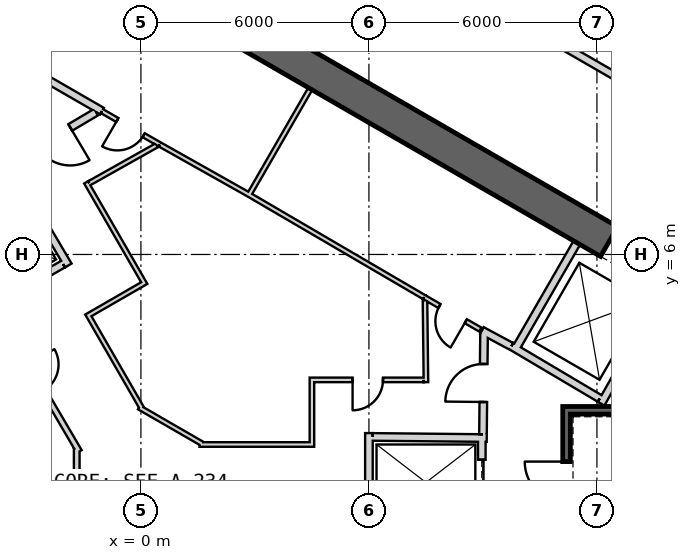
"""IFC4 building model, lengths in metres.
Left out: names, types, materials, properties, quantities, classifications, styles, units other than length and angle.
Written with IfcOpenShell. Run it as: python <this file> out.ifc"""

import sys

from ifc_helpers import new_model, si_unit, direction, frame, frame_2d, origin, place, context, subcontext, project, spatial, rectangle, extrude, element, fill, save


model = new_model("IFC4")
c1 = context("Model", 3, precision=1e-05, world=origin(), true_north=direction((0.0, 1.0)))
c2 = subcontext(c1, "Body", "Model", "MODEL_VIEW")
j1 = project(units=[si_unit("LENGTHUNIT", "METRE"), si_unit("PLANEANGLEUNIT", "RADIAN")], contexts=[c1])
p1 = place(None, origin())
s1 = spatial("IfcSite", under=j1, at=p1, CompositionType="ELEMENT")
p2 = place(p1, origin())
s2 = spatial("IfcBuilding", under=s1, at=p2, CompositionType="ELEMENT")
p3 = place(p2, frame((0.0, 0.0, 310.4)))
s3 = spatial("IfcBuildingStorey", under=s2, at=p3, CompositionType="ELEMENT", Elevation=310.4)
p4 = place(p3, frame((19.475, 2.208, 0.0), z_axis=(0.0, 0.0, 1.0), x_axis=(-0.866028369851, 0.499994862586, 0.0)))
e1 = element("IfcWall", 1, at=p4, inside=s3, PredefinedType="SHEAR", context=c2, shape_type="SweptSolid", body=[
    extrude(rectangle(XDim=31.523, YDim=0.9, at=frame_2d((15.762, 0.0))), origin(), (0.0, 0.0, 1.0), 3.9),
])
p5 = place(p4, frame((7.062, 0.0, 0.0)))
e2 = element("IfcOpeningElement", 2, at=p5, cuts=e1, PredefinedType="OPENING", context=c2, shape_type="SweptSolid", body=[
    extrude(rectangle(XDim=1.2, YDim=2.4, at=frame_2d((0.6, 1.2))), frame((0.0, 0.46, 0.0), z_axis=(0.0, -1.0, 0.0), x_axis=(1.0, 0.0, 0.0)), (0.0, 0.0, 1.0), 0.92),
])
p6 = place(p4, frame((3.612, 0.0, 0.0)))
e3 = element("IfcOpeningElement", 3, at=p6, cuts=e1, PredefinedType="OPENING", context=c2, shape_type="SweptSolid", body=[
    extrude(rectangle(XDim=1.2, YDim=2.4, at=frame_2d((0.6, 1.2))), frame((0.0, 0.46, 0.0), z_axis=(0.0, -1.0, 0.0), x_axis=(1.0, 0.0, 0.0)), (0.0, 0.0, 1.0), 0.92),
])
p7 = place(p4, frame((26.712, 0.0, 0.0)))
e4 = element("IfcOpeningElement", 4, at=p7, cuts=e1, PredefinedType="OPENING", context=c2, shape_type="SweptSolid", body=[
    extrude(rectangle(XDim=1.2, YDim=2.4, at=frame_2d((0.6, 1.2))), frame((0.0, 0.46, 0.0), z_axis=(0.0, -1.0, 0.0), x_axis=(1.0, 0.0, 0.0)), (0.0, 0.0, 1.0), 0.92),
])
p8 = place(p3, frame((9.847, 3.495, 0.0), z_axis=(0.0, 0.0, 1.0), x_axis=(0.499984717929, 0.866034226713, 0.0)))
e5 = element("IfcWall", 5, at=p8, inside=s3, PredefinedType="PLUMBINGWALL", context=c2, shape_type="SweptSolid", body=[
    extrude(rectangle(XDim=3.25, YDim=0.2, at=frame_2d((1.625, 0.0))), origin(), (0.0, 0.0, 1.0), 3.6),
])
p9 = place(p3, frame((12.11, 2.073, 0.0), z_axis=(0.0, 0.0, 1.0), x_axis=(0.49196600604, 0.870614408852, 0.0)))
e6 = element("IfcWall", 6, at=p9, inside=s3, PredefinedType="PLUMBINGWALL", context=c2, shape_type="SweptSolid", body=[
    extrude(rectangle(XDim=3.35, YDim=0.2, at=frame_2d((1.675, 0.0))), origin(), (0.0, 0.0, 1.0), 3.6),
])
p10 = place(p3, frame((12.073, 2.211, 0.0), z_axis=(0.0, 0.0, 1.0), x_axis=(-0.860414880418, 0.509594185166, 0.0)))
e7 = element("IfcWall", 7, at=p10, inside=s3, PredefinedType="PLUMBINGWALL", context=c2, shape_type="SweptSolid", body=[
    extrude(rectangle(XDim=2.7, YDim=0.2, at=frame_2d((1.35, 0.0))), origin(), (0.0, 0.0, 1.0), 3.6),
])
p11 = place(p3, frame((19.2, 1.9, -0.3), z_axis=(0.0, 0.0, 1.0), x_axis=(-1.0, 0.0, 0.0)))
e8 = element("IfcWall", 8, at=p11, inside=s3, PredefinedType="SHEAR", context=c2, shape_type="SweptSolid", body=[
    extrude(rectangle(XDim=8.1, YDim=0.2, at=frame_2d((4.05, 0.0))), origin(), (0.0, 0.0, 1.0), 3.9),
])
p12 = place(p3, frame((11.2, -1.8, -0.3), z_axis=(0.0, 0.0, 1.0), x_axis=(0.0, 1.0, 0.0)))
e9 = element("IfcWall", 9, at=p12, inside=s3, PredefinedType="SHEAR", context=c2, shape_type="SweptSolid", body=[
    extrude(rectangle(XDim=3.6, YDim=0.2, at=frame_2d((1.8, 0.0))), origin(), (0.0, 0.0, 1.0), 3.9),
])
p13 = place(p12, frame((1.25, 0.0, 0.3)))
e10 = element("IfcOpeningElement", 10, at=p13, cuts=e9, PredefinedType="OPENING", context=c2, shape_type="SweptSolid", body=[
    extrude(rectangle(XDim=1.1, YDim=2.1, at=frame_2d((0.55, 1.05))), frame((0.0, 0.11, 0.0), z_axis=(0.0, -1.0, 0.0), x_axis=(1.0, 0.0, 0.0)), (0.0, 0.0, 1.0), 0.22),
])
p14 = place(p3, frame((8.97, 1.2, 0.0), z_axis=(0.0, 0.0, 1.0), x_axis=(0.0, -1.0, 0.0)))
e11 = element("IfcWall", 11, at=p14, inside=s3, PredefinedType="PLUMBINGWALL", context=c2, shape_type="SweptSolid", body=[
    extrude(rectangle(XDim=2.4, YDim=0.2, at=frame_2d((1.2, 0.0))), origin(), (0.0, 0.0, 1.0), 3.6),
])
p15 = place(p14, frame((0.6, 0.0, 0.0)))
e12 = element("IfcOpeningElement", 12, at=p15, cuts=e11, PredefinedType="OPENING", context=c2, shape_type="SweptSolid", body=[
    extrude(rectangle(XDim=1.2, YDim=2.4, at=frame_2d((0.6, 1.2))), frame((0.0, 0.11, 0.0), z_axis=(0.0, -1.0, 0.0), x_axis=(1.0, 0.0, 0.0)), (0.0, 0.0, 1.0), 0.22),
])
p16 = place(p3, frame((6.0, -1.09, 0.0), z_axis=(0.0, 0.0, 1.0), x_axis=(0.0, 1.0, 0.0)))
e13 = element("IfcWall", 13, at=p16, inside=s3, PredefinedType="PLUMBINGWALL", context=c2, shape_type="SweptSolid", body=[
    extrude(rectangle(XDim=2.39, YDim=0.2, at=frame_2d((1.195, 0.0))), origin(), (0.0, 0.0, 1.0), 3.6),
])
p17 = place(p3, frame((9.1, 1.169, 0.0), z_axis=(0.0, 0.0, 1.0), x_axis=(-0.99994990606, 0.010009264196, 0.0)))
e14 = element("IfcWall", 14, at=p17, inside=s3, PredefinedType="PLUMBINGWALL", context=c2, shape_type="SweptSolid", body=[
    extrude(rectangle(XDim=3.0, YDim=0.2, at=frame_2d((1.5, 0.0))), origin(), (0.0, 0.0, 1.0), 3.6),
])
p18 = place(p3, frame((-3.538, 8.465, 0.0), z_axis=(0.0, 0.0, 1.0), x_axis=(0.508616218331, -0.860993346345, 0.0)))
e15 = element("IfcWall", 15, at=p18, inside=s3, PredefinedType="PLUMBINGWALL", context=c2, shape_type="SweptSolid", body=[
    extrude(rectangle(XDim=3.2, YDim=0.2, at=frame_2d((1.6, 0.0))), origin(), (0.0, 0.0, 1.0), 3.6),
])
p19 = place(p3, frame((-2.047, 5.746, 0.0), z_axis=(0.0, 0.0, 1.0), x_axis=(-0.866019606374, -0.500010041276, 0.0)))
e16 = element("IfcWall", 16, at=p19, inside=s3, PredefinedType="PLUMBINGWALL", context=c2, shape_type="SweptSolid", body=[
    extrude(rectangle(XDim=2.205, YDim=0.2, at=frame_2d((1.102, 0.0))), origin(), (0.0, 0.0, 1.0), 3.6),
])
p20 = place(p3, frame((4.457, 10.359, 0.0), z_axis=(0.0, 0.0, 1.0), x_axis=(-0.500017246033, -0.866015446554, 0.0)))
e17 = element("IfcWall", 17, at=p20, inside=s3, PredefinedType="PARTITIONING", context=c2, shape_type="SweptSolid", body=[
    extrude(rectangle(XDim=3.25, YDim=0.12, at=frame_2d((1.625, 0.0))), origin(), (0.0, 0.0, 1.0), 3.6),
])
p21 = place(p3, frame((8.974, 3.999, 0.0), z_axis=(0.0, 0.0, 1.0), x_axis=(0.880917147855, -0.473270513147, 0.0)))
e18 = element("IfcWall", 18, at=p21, inside=s3, PredefinedType="PARTITIONING", context=c2, shape_type="SweptSolid", body=[
    extrude(rectangle(XDim=0.878, YDim=0.2, at=frame_2d((0.439, 0.0))), origin(), (0.0, 0.0, 1.0), 3.6),
])
p22 = place(p3, frame((7.457, 4.875, 0.0), z_axis=(0.0, 0.0, 1.0), x_axis=(-0.863262357411, 0.504755487615, 0.0)))
e19 = element("IfcWall", 19, at=p22, inside=s3, PredefinedType="PARTITIONING", context=c2, shape_type="SweptSolid", body=[
    extrude(rectangle(XDim=5.37, YDim=0.12, at=frame_2d((2.685, 0.0))), origin(), (0.0, 0.0, 1.0), 3.6),
])
p23 = place(p3, frame((-1.024, 9.771, 0.0), z_axis=(0.0, 0.0, 1.0), x_axis=(0.866039397417, -0.499975761534, 0.0)))
e20 = element("IfcWall", 20, at=p23, inside=s3, PredefinedType="PARTITIONING", context=c2, shape_type="SweptSolid", body=[
    extrude(rectangle(XDim=1.752, YDim=0.12, at=frame_2d((0.876, 0.0))), origin(), (0.0, 0.0, 1.0), 3.6),
])
p24 = place(p23, frame((0.466, 0.0, 0.0)))
e21 = element("IfcOpeningElement", 21, at=p24, cuts=e20, PredefinedType="OPENING", context=c2, shape_type="SweptSolid", body=[
    extrude(rectangle(XDim=0.8, YDim=2.1, at=frame_2d((0.4, 1.05))), frame((0.0, 0.07, 0.0), z_axis=(0.0, -1.0, 0.0), x_axis=(1.0, 0.0, 0.0)), (0.0, 0.0, 1.0), 0.14),
])
p25 = place(p3, frame((7.457, 4.875, 0.0), z_axis=(0.0, 0.0, 1.0), x_axis=(0.866027945518, -0.499995597562, 0.0)))
e22 = element("IfcWall", 22, at=p25, inside=s3, PredefinedType="PARTITIONING", context=c2, shape_type="SweptSolid", body=[
    extrude(rectangle(XDim=1.702, YDim=0.12, at=frame_2d((0.851, 0.0))), origin(), (0.0, 0.0, 1.0), 3.6),
])
p26 = place(p25, frame((0.461, 0.0, 0.0)))
e23 = element("IfcOpeningElement", 23, at=p26, cuts=e22, PredefinedType="OPENING", context=c2, shape_type="SweptSolid", body=[
    extrude(rectangle(XDim=0.8, YDim=2.1, at=frame_2d((0.4, 1.05))), frame((0.0, 0.07, 0.0), z_axis=(0.0, -1.0, 0.0), x_axis=(1.0, 0.0, 0.0)), (0.0, 0.0, 1.0), 0.14),
])
p27 = place(p3, frame((-4.296, 11.66, 0.0), z_axis=(0.0, 0.0, 1.0), x_axis=(0.866027389382, -0.499996560828, 0.0)))
e24 = element("IfcWall", 24, at=p27, inside=s3, PredefinedType="PARTITIONING", context=c2, shape_type="SweptSolid", body=[
    extrude(rectangle(XDim=3.778, YDim=0.2, at=frame_2d((1.889, 0.0))), origin(), (0.0, 0.0, 1.0), 3.6),
])
p28 = place(p3, frame((2.821, 7.586, 0.0), z_axis=(0.0, 0.0, 1.0), x_axis=(-0.871426548871, 0.490526013503, 0.0)))
e25 = element("IfcWall", 25, at=p28, inside=s3, PredefinedType="PARTITIONING", context=c2, shape_type="SweptSolid", body=[
    extrude(rectangle(XDim=2.67, YDim=0.12, at=frame_2d((1.335, 0.0))), origin(), (0.0, 0.0, 1.0), 3.6),
])
p29 = place(p3, frame((9.001, 1.27, 0.0), z_axis=(0.0, 0.0, 1.0), x_axis=(0.010723968736, 0.999942496594, 0.0)))
e26 = element("IfcWall", 26, at=p29, inside=s3, PredefinedType="PARTITIONING", context=c2, shape_type="SweptSolid", body=[
    extrude(rectangle(XDim=2.709, YDim=0.2, at=frame_2d((1.354, 0.0))), origin(), (0.0, 0.0, 1.0), 3.6),
])
p30 = place(p29, frame((0.848, 0.0, 0.0)))
e27 = element("IfcOpeningElement", 27, at=p30, cuts=e26, PredefinedType="OPENING", context=c2, shape_type="SweptSolid", body=[
    extrude(rectangle(XDim=1.0, YDim=2.1, at=frame_2d((0.5, 1.05))), frame((0.0, 0.11, 0.0), z_axis=(0.0, -1.0, 0.0), x_axis=(1.0, 0.0, 0.0)), (0.0, 0.0, 1.0), 0.22),
])
p31 = place(p3, frame((-1.179, 9.745, 0.0), z_axis=(0.0, 0.0, 1.0), x_axis=(-0.860630814782, -0.509229418482, 0.0)))
e28 = element("IfcWall", 28, at=p31, inside=s3, PredefinedType="PARTITIONING", context=c2, shape_type="SweptSolid", body=[
    extrude(rectangle(XDim=2.582, YDim=0.2, at=frame_2d((1.291, 0.0))), origin(), (0.0, 0.0, 1.0), 3.6),
])
p32 = place(p31, frame((0.791, 0.0, 0.0)))
e29 = element("IfcOpeningElement", 29, at=p32, cuts=e28, PredefinedType="OPENING", context=c2, shape_type="SweptSolid", body=[
    extrude(rectangle(XDim=1.0, YDim=2.1, at=frame_2d((0.5, 1.05))), frame((0.0, 0.11, 0.0), z_axis=(0.0, -1.0, 0.0), x_axis=(1.0, 0.0, 0.0)), (0.0, 0.0, 1.0), 0.22),
])
p33 = place(p3, frame((-1.624, 0.815, 0.0), z_axis=(0.0, 0.0, 1.0), x_axis=(-0.505868173579, 0.862610799237, 0.0)))
e30 = element("IfcWall", 30, at=p33, inside=s3, PredefinedType="PLUMBINGWALL", context=c2, shape_type="SweptSolid", body=[
    extrude(rectangle(XDim=4.383, YDim=0.15, at=frame_2d((2.191, 0.0))), origin(), (0.0, 0.0, 1.0), 3.6),
])
p34 = place(p33, frame((1.855, 0.0, 0.0)))
e31 = element("IfcOpeningElement", 31, at=p34, cuts=e30, PredefinedType="OPENING", context=c2, shape_type="SweptSolid", body=[
    extrude(rectangle(XDim=0.8, YDim=2.1, at=frame_2d((0.4, 1.05))), frame((0.0, 0.085, 0.0), z_axis=(0.0, -1.0, 0.0), x_axis=(1.0, 0.0, 0.0)), (0.0, 0.0, 1.0), 0.17),
])
p35 = place(p3, frame((-1.689, -1.053, 0.0), z_axis=(0.0, 0.0, 1.0), x_axis=(0.0, 1.0, 0.0)))
e32 = element("IfcWall", 32, at=p35, inside=s3, PredefinedType="PLUMBINGWALL", context=c2, shape_type="SweptSolid", body=[
    extrude(rectangle(XDim=1.954, YDim=0.15, at=frame_2d((0.977, 0.0))), origin(), (0.0, 0.0, 1.0), 3.6),
])
p36 = place(p3, frame((7.501, 2.64, 0.0), z_axis=(0.0, 0.0, 1.0), x_axis=(-0.01178388431, 0.999930567625, 0.0)))
e33 = element("IfcWall", 33, at=p36, inside=s3, PredefinedType="PARTITIONING", context=c2, shape_type="SweptSolid", body=[
    extrude(rectangle(XDim=2.155, YDim=0.12, at=frame_2d((1.077, 0.0))), origin(), (0.0, 0.0, 1.0), 3.6),
])
p37 = place(p3, frame((4.44, 2.7, 0.0), z_axis=(0.0, 0.0, 1.0), x_axis=(1.0, 0.0, 0.0)))
e34 = element("IfcWall", 34, at=p37, inside=s3, PredefinedType="PARTITIONING", context=c2, shape_type="SweptSolid", body=[
    extrude(rectangle(XDim=3.0, YDim=0.12, at=frame_2d((1.5, 0.0))), origin(), (0.0, 0.0, 1.0), 3.6),
])
p38 = place(p37, frame((1.13, 0.0, 0.0)))
e35 = element("IfcOpeningElement", 35, at=p38, cuts=e34, PredefinedType="OPENING", context=c2, shape_type="SweptSolid", body=[
    extrude(rectangle(XDim=0.8, YDim=2.1, at=frame_2d((0.4, 1.05))), frame((0.0, 0.07, 0.0), z_axis=(0.0, -1.0, 0.0), x_axis=(1.0, 0.0, 0.0)), (0.0, 0.0, 1.0), 0.14),
])
p39 = place(p3, frame((4.5, 0.94, 0.0), z_axis=(0.0, 0.0, 1.0), x_axis=(0.0, 1.0, 0.0)))
e36 = element("IfcWall", 36, at=p39, inside=s3, PredefinedType="PARTITIONING", context=c2, shape_type="SweptSolid", body=[
    extrude(rectangle(XDim=1.7, YDim=0.12, at=frame_2d((0.85, 0.0))), origin(), (0.0, 0.0, 1.0), 3.6),
])
p40 = place(p3, frame((1.542, 1.0, 0.0), z_axis=(0.0, 0.0, 1.0), x_axis=(1.0, 0.0, 0.0)))
e37 = element("IfcWall", 37, at=p40, inside=s3, PredefinedType="PARTITIONING", context=c2, shape_type="SweptSolid", body=[
    extrude(rectangle(XDim=2.898, YDim=0.12, at=frame_2d((1.449, 0.0))), origin(), (0.0, 0.0, 1.0), 3.6),
])
p41 = place(p3, frame((-0.047, 1.977, 0.0), z_axis=(0.0, 0.0, 1.0), x_axis=(0.865998615205, -0.500046396311, 0.0)))
e38 = element("IfcWall", 38, at=p41, inside=s3, PredefinedType="PARTITIONING", context=c2, shape_type="SweptSolid", body=[
    extrude(rectangle(XDim=1.935, YDim=0.12, at=frame_2d((0.968, 0.0))), origin(), (0.0, 0.0, 1.0), 3.6),
])
p42 = place(p3, frame((-1.414, 4.449, 0.0), z_axis=(0.0, 0.0, 1.0), x_axis=(0.500028961621, -0.866008682139, 0.0)))
e39 = element("IfcWall", 39, at=p42, inside=s3, PredefinedType="PARTITIONING", context=c2, shape_type="SweptSolid", body=[
    extrude(rectangle(XDim=2.896, YDim=0.12, at=frame_2d((1.448, 0.0))), origin(), (0.0, 0.0, 1.0), 3.6),
])
p43 = place(p3, frame((0.14, 5.277, 0.0), z_axis=(0.0, 0.0, 1.0), x_axis=(-0.865989465428, -0.500062241894, 0.0)))
e40 = element("IfcWall", 40, at=p43, inside=s3, PredefinedType="PARTITIONING", context=c2, shape_type="SweptSolid", body=[
    extrude(rectangle(XDim=1.7, YDim=0.12, at=frame_2d((0.85, 0.0))), origin(), (0.0, 0.0, 1.0), 3.6),
])
p44 = place(p3, frame((-1.442, 7.897, 0.0), z_axis=(0.0, 0.0, 1.0), x_axis=(0.499990139034, -0.866031096941, 0.0)))
e41 = element("IfcWall", 41, at=p44, inside=s3, PredefinedType="PARTITIONING", context=c2, shape_type="SweptSolid", body=[
    extrude(rectangle(XDim=3.0, YDim=0.12, at=frame_2d((1.5, 0.0))), origin(), (0.0, 0.0, 1.0), 3.6),
])
p45 = place(p3, frame((0.414, 8.871, 0.0), z_axis=(0.0, 0.0, 1.0), x_axis=(-0.871809386997, -0.48984527429, 0.0)))
e42 = element("IfcWall", 42, at=p45, inside=s3, PredefinedType="PARTITIONING", context=c2, shape_type="SweptSolid", body=[
    extrude(rectangle(XDim=2.034, YDim=0.12, at=frame_2d((1.017, 0.0))), origin(), (0.0, 0.0, 1.0), 3.6),
])
p46 = place(p3, frame((22.074, 5.153, 0.0), z_axis=(0.0, 0.0, 1.0), x_axis=(-0.866024844342, 0.500000968981, 0.0)))
e43 = element("IfcWall", 43, at=p46, inside=s3, PredefinedType="PARTITIONING", context=c2, shape_type="SweptSolid", body=[
    extrude(rectangle(XDim=17.073, YDim=0.2, at=frame_2d((8.536, 0.0))), origin(), (0.0, 0.0, 1.0), 2.88),
])
p47 = place(p46, frame((8.075, 0.0, 0.0)))
e44 = element("IfcOpeningElement", 44, at=p47, cuts=e43, PredefinedType="OPENING", context=c2, shape_type="SweptSolid", body=[
    extrude(rectangle(XDim=1.0, YDim=2.1, at=frame_2d((0.5, 1.05))), frame((0.0, 0.11, 0.0), z_axis=(0.0, -1.0, 0.0), x_axis=(1.0, 0.0, 0.0)), (0.0, 0.0, 1.0), 0.22),
])
p48 = place(p13, origin())
e45 = element("IfcDoor", 45, at=p48, inside=s3, OperationType="SINGLE_SWING_LEFT", PredefinedType="USERDEFINED", context=c2, shape_type="SweptSolid", body=[
    extrude(rectangle(XDim=1.1, YDim=2.1, at=frame_2d((0.55, 1.05))), frame((0.0, 0.025, 0.0), z_axis=(0.0, -1.0, 0.0), x_axis=(1.0, 0.0, 0.0)), (0.0, 0.0, 1.0), 0.05),
])
fill(e10, e45)
p49 = place(p30, origin())
e46 = element("IfcDoor", 46, at=p49, inside=s3, OperationType="SINGLE_SWING_LEFT", PredefinedType="USERDEFINED", context=c2, shape_type="SweptSolid", body=[
    extrude(rectangle(XDim=1.0, YDim=2.1, at=frame_2d((0.5, 1.05))), frame((0.0, 0.025, 0.0), z_axis=(0.0, -1.0, 0.0), x_axis=(1.0, 0.0, 0.0)), (0.0, 0.0, 1.0), 0.05),
])
fill(e27, e46)
p50 = place(p15, origin())
e47 = element("IfcDoor", 47, at=p50, inside=s3, OperationType="SLIDING_TO_LEFT", PredefinedType="USERDEFINED", context=c2, shape_type="SweptSolid", body=[
    extrude(rectangle(XDim=1.2, YDim=2.4, at=frame_2d((0.6, 1.2))), frame((0.0, 0.025, 0.0), z_axis=(0.0, -1.0, 0.0), x_axis=(1.0, 0.0, 0.0)), (0.0, 0.0, 1.0), 0.05),
])
fill(e12, e47)
p51 = place(p32, origin())
e48 = element("IfcDoor", 48, at=p51, inside=s3, OperationType="SINGLE_SWING_LEFT", PredefinedType="USERDEFINED", context=c2, shape_type="SweptSolid", body=[
    extrude(rectangle(XDim=1.0, YDim=2.1, at=frame_2d((0.5, 1.05))), frame((0.0, 0.025, 0.0), z_axis=(0.0, -1.0, 0.0), x_axis=(1.0, 0.0, 0.0)), (0.0, 0.0, 1.0), 0.05),
])
fill(e29, e48)
p52 = place(p38, origin())
e49 = element("IfcDoor", 49, at=p52, inside=s3, OperationType="SINGLE_SWING_LEFT", PredefinedType="USERDEFINED", context=c2, shape_type="SweptSolid", body=[
    extrude(rectangle(XDim=0.8, YDim=2.1, at=frame_2d((0.4, 1.05))), frame((0.0, 0.025, 0.0), z_axis=(0.0, -1.0, 0.0), x_axis=(1.0, 0.0, 0.0)), (0.0, 0.0, 1.0), 0.05),
])
fill(e35, e49)
p53 = place(p26, origin())
e50 = element("IfcDoor", 50, at=p53, inside=s3, OperationType="SINGLE_SWING_LEFT", PredefinedType="USERDEFINED", context=c2, shape_type="SweptSolid", body=[
    extrude(rectangle(XDim=0.8, YDim=2.1, at=frame_2d((0.4, 1.05))), frame((0.0, 0.025, 0.0), z_axis=(0.0, -1.0, 0.0), x_axis=(1.0, 0.0, 0.0)), (0.0, 0.0, 1.0), 0.05),
])
fill(e23, e50)
p54 = place(p24, origin())
e51 = element("IfcDoor", 51, at=p54, inside=s3, OperationType="SINGLE_SWING_RIGHT", PredefinedType="USERDEFINED", context=c2, shape_type="SweptSolid", body=[
    extrude(rectangle(XDim=0.8, YDim=2.1, at=frame_2d((0.4, 1.05))), frame((0.0, 0.025, 0.0), z_axis=(0.0, -1.0, 0.0), x_axis=(1.0, 0.0, 0.0)), (0.0, 0.0, 1.0), 0.05),
])
fill(e21, e51)
p55 = place(p5, origin())
e52 = element("IfcDoor", 52, at=p55, inside=s3, OperationType="SLIDING_TO_LEFT", PredefinedType="USERDEFINED", context=c2, shape_type="SweptSolid", body=[
    extrude(rectangle(XDim=1.2, YDim=2.4, at=frame_2d((0.6, 1.2))), frame((0.0, 0.025, 0.0), z_axis=(0.0, -1.0, 0.0), x_axis=(1.0, 0.0, 0.0)), (0.0, 0.0, 1.0), 0.05),
])
fill(e2, e52)
save(model, sys.argv[1])
